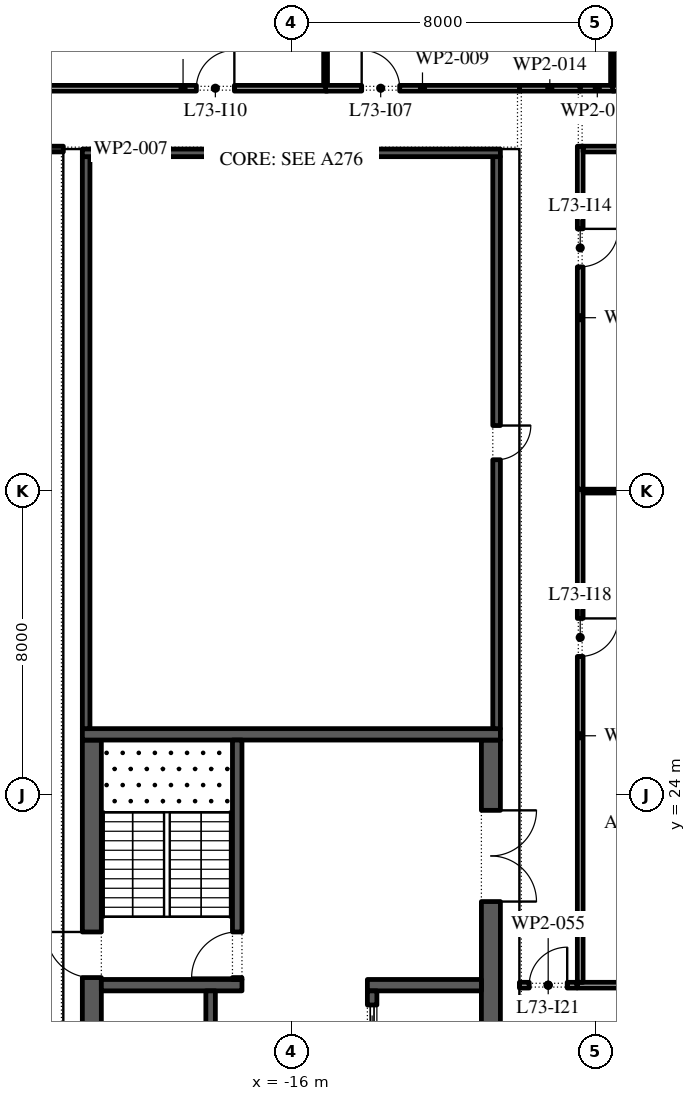
"""IFC4 building model, lengths in metres.
Left out: names, types, materials, properties, quantities, classifications, styles, units other than length and angle.
Written with IfcOpenShell. Run it as: python <this file> out.ifc"""

import sys

from ifc_helpers import new_model, si_unit, direction, frame, frame_2d, origin, place, context, subcontext, project, spatial, rectangle, extrude, element, fill, save


model = new_model("IFC4")
c1 = context("Model", 3, precision=1e-05, world=origin(), true_north=direction((0.0, 1.0)))
c2 = subcontext(c1, "Body", "Model", "MODEL_VIEW")
j1 = project(units=[si_unit("LENGTHUNIT", "METRE"), si_unit("PLANEANGLEUNIT", "RADIAN")], contexts=[c1])
p1 = place(None, origin())
s1 = spatial("IfcSite", under=j1, at=p1, CompositionType="ELEMENT")
p2 = place(p1, origin())
s2 = spatial("IfcBuilding", under=s1, at=p2, CompositionType="ELEMENT")
p3 = place(p2, frame((0.0, 0.0, 334.2)))
s3 = spatial("IfcBuildingStorey", under=s2, at=p3, CompositionType="ELEMENT", Elevation=334.2)
p4 = place(p3, frame((-21.25, -2.45, 0.0), z_axis=(0.0, 0.0, 1.0), x_axis=(0.0, 1.0, 0.0)))
e1 = element("IfcWall", 1, at=p4, inside=s3, PredefinedType="SHEAR", context=c2, shape_type="SweptSolid", body=[
    extrude(rectangle(XDim=27.9, YDim=0.5, at=frame_2d((13.95, 0.0))), origin(), (0.0, 0.0, 1.0), 4.0),
])
p5 = place(p4, frame((5.05, 0.0, 0.0)))
e2 = element("IfcOpeningElement", 2, at=p5, cuts=e1, PredefinedType="OPENING", context=c2, shape_type="SweptSolid", body=[
    extrude(rectangle(XDim=1.2, YDim=2.1, at=frame_2d((0.6, 1.05))), frame((0.0, 0.26, 0.0), z_axis=(0.0, -1.0, 0.0), x_axis=(1.0, 0.0, 0.0)), (0.0, 0.0, 1.0), 0.52),
])
p6 = place(p4, frame((21.65, 0.0, 0.0)))
e3 = element("IfcOpeningElement", 3, at=p6, cuts=e1, PredefinedType="OPENING", context=c2, shape_type="SweptSolid", body=[
    extrude(rectangle(XDim=1.2, YDim=2.1, at=frame_2d((0.6, 1.05))), frame((0.0, 0.26, 0.0), z_axis=(0.0, -1.0, 0.0), x_axis=(1.0, 0.0, 0.0)), (0.0, 0.0, 1.0), 0.52),
])
p7 = place(p3, frame((-10.75, -2.45, 0.0), z_axis=(0.0, 0.0, 1.0), x_axis=(0.0, 1.0, 0.0)))
e4 = element("IfcWall", 4, at=p7, inside=s3, PredefinedType="SHEAR", context=c2, shape_type="SweptSolid", body=[
    extrude(rectangle(XDim=27.9, YDim=0.5, at=frame_2d((13.95, 0.0))), origin(), (0.0, 0.0, 1.0), 4.0),
])
p8 = place(p7, frame((23.65, 0.0, 0.0)))
e5 = element("IfcOpeningElement", 5, at=p8, cuts=e4, PredefinedType="OPENING", context=c2, shape_type="SweptSolid", body=[
    extrude(rectangle(XDim=2.4, YDim=2.1, at=frame_2d((1.2, 1.05))), frame((0.0, 0.26, 0.0), z_axis=(0.0, -1.0, 0.0), x_axis=(1.0, 0.0, 0.0)), (0.0, 0.0, 1.0), 0.52),
])
p9 = place(p7, frame((0.788, 0.0, 0.0)))
e6 = element("IfcOpeningElement", 6, at=p9, cuts=e4, PredefinedType="OPENING", context=c2, shape_type="SweptSolid", body=[
    extrude(rectangle(XDim=0.9, YDim=2.1, at=frame_2d((0.45, 1.05))), frame((0.0, 0.26, 0.0), z_axis=(0.0, -1.0, 0.0), x_axis=(1.0, 0.0, 0.0)), (0.0, 0.0, 1.0), 0.52),
])
p10 = place(p7, frame((3.962, 0.0, 0.0)))
e7 = element("IfcOpeningElement", 7, at=p10, cuts=e4, PredefinedType="OPENING", context=c2, shape_type="SweptSolid", body=[
    extrude(rectangle(XDim=1.0, YDim=2.1, at=frame_2d((0.5, 1.05))), frame((0.0, 0.26, 0.0), z_axis=(0.0, -1.0, 0.0), x_axis=(1.0, 0.0, 0.0)), (0.0, 0.0, 1.0), 0.52),
])
p11 = place(p3, frame((-21.5, 25.6, 0.0), z_axis=(0.0, 0.0, 1.0), x_axis=(1.0, 0.0, 0.0)))
e8 = element("IfcWall", 8, at=p11, inside=s3, PredefinedType="SHEAR", context=c2, shape_type="SweptSolid", body=[
    extrude(rectangle(XDim=11.0, YDim=0.3, at=frame_2d((5.5, 0.0))), origin(), (0.0, 0.0, 1.0), 4.0),
])
p12 = place(p3, frame((-21.0, 19.0, 0.0), z_axis=(0.0, 0.0, 1.0), x_axis=(1.0, 0.0, 0.0)))
e9 = element("IfcWall", 9, at=p12, inside=s3, PredefinedType="SHEAR", context=c2, shape_type="SweptSolid", body=[
    extrude(rectangle(XDim=3.7, YDim=0.3, at=frame_2d((1.85, 0.0))), origin(), (0.0, 0.0, 1.0), 4.0),
])
p13 = place(p3, frame((-17.425, 19.15, 0.0), z_axis=(0.0, 0.0, 1.0), x_axis=(0.0, 1.0, 0.0)))
e10 = element("IfcWall", 10, at=p13, inside=s3, PredefinedType="SHEAR", context=c2, shape_type="SweptSolid", body=[
    extrude(rectangle(XDim=6.3, YDim=0.25, at=frame_2d((3.15, 0.0))), origin(), (0.0, 0.0, 1.0), 4.0),
])
p14 = place(p13, frame((0.05, 0.0, 0.0)))
e11 = element("IfcOpeningElement", 11, at=p14, cuts=e10, PredefinedType="OPENING", context=c2, shape_type="SweptSolid", body=[
    extrude(rectangle(XDim=1.2, YDim=2.1, at=frame_2d((0.6, 1.05))), frame((0.0, 0.135, 0.0), z_axis=(0.0, -1.0, 0.0), x_axis=(1.0, 0.0, 0.0)), (0.0, 0.0, 1.0), 0.27),
])
p15 = place(p3, frame((-18.125, 4.15, 0.0), z_axis=(0.0, 0.0, 1.0), x_axis=(0.0, 1.0, 0.0)))
e12 = element("IfcWall", 12, at=p15, inside=s3, PredefinedType="SHEAR", context=c2, shape_type="SweptSolid", body=[
    extrude(rectangle(XDim=14.7, YDim=0.25, at=frame_2d((7.35, 0.0))), origin(), (0.0, 0.0, 1.0), 4.0),
])
p16 = place(p15, frame((4.846, 0.0, 0.0)))
e13 = element("IfcOpeningElement", 13, at=p16, cuts=e12, PredefinedType="OPENING", context=c2, shape_type="SweptSolid", body=[
    extrude(rectangle(XDim=0.9, YDim=2.1, at=frame_2d((0.45, 1.05))), frame((0.0, 0.135, 0.0), z_axis=(0.0, -1.0, 0.0), x_axis=(1.0, 0.0, 0.0)), (0.0, 0.0, 1.0), 0.27),
])
p17 = place(p15, frame((11.125, 0.0, 0.0)))
e14 = element("IfcOpeningElement", 14, at=p17, cuts=e12, PredefinedType="OPENING", context=c2, shape_type="SweptSolid", body=[
    extrude(rectangle(XDim=0.9, YDim=2.1, at=frame_2d((0.45, 1.05))), frame((0.0, 0.135, 0.0), z_axis=(0.0, -1.0, 0.0), x_axis=(1.0, 0.0, 0.0)), (0.0, 0.0, 1.0), 0.27),
])
p18 = place(p15, frame((0.371, 0.0, 0.0)))
e15 = element("IfcOpeningElement", 15, at=p18, cuts=e12, PredefinedType="OPENING", context=c2, shape_type="SweptSolid", body=[
    extrude(rectangle(XDim=1.1, YDim=2.1, at=frame_2d((0.55, 1.05))), frame((0.0, 0.135, 0.0), z_axis=(0.0, -1.0, 0.0), x_axis=(1.0, 0.0, 0.0)), (0.0, 0.0, 1.0), 0.27),
])
p19 = place(p3, frame((-14.0, 19.0, 0.0), z_axis=(0.0, 0.0, 1.0), x_axis=(1.0, 0.0, 0.0)))
e16 = element("IfcWall", 16, at=p19, inside=s3, PredefinedType="SHEAR", context=c2, shape_type="SweptSolid", body=[
    extrude(rectangle(XDim=3.0, YDim=0.3, at=frame_2d((1.5, 0.0))), origin(), (0.0, 0.0, 1.0), 4.0),
])
p20 = place(p3, frame((-13.875, -2.45, 0.0), z_axis=(0.0, 0.0, 1.0), x_axis=(0.0, 1.0, 0.0)))
e17 = element("IfcWall", 17, at=p20, inside=s3, PredefinedType="SHEAR", context=c2, shape_type="SweptSolid", body=[
    extrude(rectangle(XDim=21.3, YDim=0.25, at=frame_2d((10.65, 0.0))), origin(), (0.0, 0.0, 1.0), 4.0),
])
p21 = place(p20, frame((11.357, 0.0, 0.0)))
e18 = element("IfcOpeningElement", 18, at=p21, cuts=e17, PredefinedType="OPENING", context=c2, shape_type="SweptSolid", body=[
    extrude(rectangle(XDim=0.9, YDim=2.1, at=frame_2d((0.45, 1.05))), frame((0.0, 0.135, 0.0), z_axis=(0.0, -1.0, 0.0), x_axis=(1.0, 0.0, 0.0)), (0.0, 0.0, 1.0), 0.27),
])
p22 = place(p20, frame((6.971, 0.0, 0.0)))
e19 = element("IfcOpeningElement", 19, at=p22, cuts=e17, PredefinedType="OPENING", context=c2, shape_type="SweptSolid", body=[
    extrude(rectangle(XDim=1.1, YDim=2.1, at=frame_2d((0.55, 1.05))), frame((0.0, 0.135, 0.0), z_axis=(0.0, -1.0, 0.0), x_axis=(1.0, 0.0, 0.0)), (0.0, 0.0, 1.0), 0.27),
])
p23 = place(p20, frame((15.543, 0.0, 0.0)))
e20 = element("IfcOpeningElement", 20, at=p23, cuts=e17, PredefinedType="OPENING", context=c2, shape_type="SweptSolid", body=[
    extrude(rectangle(XDim=1.1, YDim=2.1, at=frame_2d((0.55, 1.05))), frame((0.0, 0.135, 0.0), z_axis=(0.0, -1.0, 0.0), x_axis=(1.0, 0.0, 0.0)), (0.0, 0.0, 1.0), 0.27),
])
p24 = place(p20, frame((17.686, 0.0, 0.0)))
e21 = element("IfcOpeningElement", 21, at=p24, cuts=e17, PredefinedType="OPENING", context=c2, shape_type="SweptSolid", body=[
    extrude(rectangle(XDim=1.1, YDim=2.1, at=frame_2d((0.55, 1.05))), frame((0.0, 0.135, 0.0), z_axis=(0.0, -1.0, 0.0), x_axis=(1.0, 0.0, 0.0)), (0.0, 0.0, 1.0), 0.27),
])
p25 = place(p20, frame((19.829, 0.0, 0.0)))
e22 = element("IfcOpeningElement", 22, at=p25, cuts=e17, PredefinedType="OPENING", context=c2, shape_type="SweptSolid", body=[
    extrude(rectangle(XDim=1.1, YDim=2.1, at=frame_2d((0.55, 1.05))), frame((0.0, 0.135, 0.0), z_axis=(0.0, -1.0, 0.0), x_axis=(1.0, 0.0, 0.0)), (0.0, 0.0, 1.0), 0.27),
])
p26 = place(p3, frame((-21.4, 25.75, 0.0), z_axis=(0.0, 0.0, 1.0), x_axis=(0.0, 1.0, 0.0)))
e23 = element("IfcWall", 23, at=p26, inside=s3, PredefinedType="SHEAR", context=c2, shape_type="SweptSolid", body=[
    extrude(rectangle(XDim=15.05, YDim=0.2, at=frame_2d((7.525, 0.0))), origin(), (0.0, 0.0, 1.0), 4.0),
])
p27 = place(p3, frame((-10.6, 25.75, 0.0), z_axis=(0.0, 0.0, 1.0), x_axis=(0.0, 1.0, 0.0)))
e24 = element("IfcWall", 24, at=p27, inside=s3, PredefinedType="SHEAR", context=c2, shape_type="SweptSolid", body=[
    extrude(rectangle(XDim=15.05, YDim=0.2, at=frame_2d((7.525, 0.0))), origin(), (0.0, 0.0, 1.0), 4.0),
])
p28 = place(p27, frame((7.075, 0.0, 0.0)))
e25 = element("IfcOpeningElement", 25, at=p28, cuts=e24, PredefinedType="OPENING", context=c2, shape_type="SweptSolid", body=[
    extrude(rectangle(XDim=0.9, YDim=2.1, at=frame_2d((0.45, 1.05))), frame((0.0, 0.11, 0.0), z_axis=(0.0, -1.0, 0.0), x_axis=(1.0, 0.0, 0.0)), (0.0, 0.0, 1.0), 0.22),
])
p29 = place(p3, frame((-21.5, 40.9, 0.0), z_axis=(0.0, 0.0, 1.0), x_axis=(1.0, 0.0, 0.0)))
e26 = element("IfcWall", 26, at=p29, inside=s3, PredefinedType="SHEAR", context=c2, shape_type="SweptSolid", body=[
    extrude(rectangle(XDim=11.0, YDim=0.2, at=frame_2d((5.5, 0.0))), origin(), (0.0, 0.0, 1.0), 4.0),
])
p30 = place(p3, frame((-22.65, 42.6, 0.0), z_axis=(0.0, 0.0, 1.0), x_axis=(1.0, 0.0, 0.0)))
e27 = element("IfcWall", 27, at=p30, inside=s3, PredefinedType="PARTITIONING", context=c2, shape_type="SweptSolid", body=[
    extrude(rectangle(XDim=7.6, YDim=0.15, at=frame_2d((3.8, 0.0))), origin(), (0.0, 0.0, 1.0), 4.0),
])
p31 = place(p30, frame((4.15, 0.0, 0.0)))
e28 = element("IfcOpeningElement", 28, at=p31, cuts=e27, PredefinedType="OPENING", context=c2, shape_type="SweptSolid", body=[
    extrude(rectangle(XDim=1.0, YDim=2.1, at=frame_2d((0.5, 1.05))), frame((0.0, 0.085, 0.0), z_axis=(0.0, -1.0, 0.0), x_axis=(1.0, 0.0, 0.0)), (0.0, 0.0, 1.0), 0.17),
])
p32 = place(p3, frame((-22.0, 41.0, 0.0), z_axis=(0.0, 0.0, 1.0), x_axis=(-1.0, 0.0, 0.0)))
e29 = element("IfcWall", 29, at=p32, inside=s3, PredefinedType="PARTITIONING", context=c2, shape_type="SweptSolid", body=[
    extrude(rectangle(XDim=4.05, YDim=0.15, at=frame_2d((2.025, 0.0))), origin(), (0.0, 0.0, 1.0), 4.0),
])
p33 = place(p32, frame((2.1, 0.0, 0.0)))
e30 = element("IfcOpeningElement", 30, at=p33, cuts=e29, PredefinedType="OPENING", context=c2, shape_type="SweptSolid", body=[
    extrude(rectangle(XDim=1.0, YDim=2.1, at=frame_2d((0.5, 1.05))), frame((0.0, 0.085, 0.0), z_axis=(0.0, -1.0, 0.0), x_axis=(1.0, 0.0, 0.0)), (0.0, 0.0, 1.0), 0.17),
])
p34 = place(p3, frame((-15.1, 42.675, 0.0), z_axis=(0.0, 0.0, 1.0), x_axis=(0.0, 1.0, 0.0)))
e31 = element("IfcWall", 31, at=p34, inside=s3, PredefinedType="PARTITIONING", context=c2, shape_type="SweptSolid", body=[
    extrude(rectangle(XDim=4.375, YDim=0.1, at=frame_2d((2.188, 0.0))), origin(), (0.0, 0.0, 1.0), 4.0),
])
p35 = place(p3, frame((-15.1, 42.6, 0.0), z_axis=(0.0, 0.0, 1.0), x_axis=(1.0, 0.0, 0.0)))
e32 = element("IfcWall", 32, at=p35, inside=s3, PredefinedType="PARTITIONING", context=c2, shape_type="SweptSolid", body=[
    extrude(rectangle(XDim=5.1, YDim=0.15, at=frame_2d((2.55, 0.0))), origin(), (0.0, 0.0, 1.0), 4.0),
])
p36 = place(p35, frame((0.95, 0.0, 0.0)))
e33 = element("IfcOpeningElement", 33, at=p36, cuts=e32, PredefinedType="OPENING", context=c2, shape_type="SweptSolid", body=[
    extrude(rectangle(XDim=1.0, YDim=2.1, at=frame_2d((0.5, 1.05))), frame((0.0, 0.085, 0.0), z_axis=(0.0, -1.0, 0.0), x_axis=(1.0, 0.0, 0.0)), (0.0, 0.0, 1.0), 0.17),
])
p37 = place(p3, frame((-10.0, 42.6, 0.0), z_axis=(0.0, 0.0, 1.0), x_axis=(1.0, 0.0, 0.0)))
e34 = element("IfcWall", 34, at=p37, inside=s3, PredefinedType="PARTITIONING", context=c2, shape_type="SweptSolid", body=[
    extrude(rectangle(XDim=1.6, YDim=0.15, at=frame_2d((0.8, 0.0))), origin(), (0.0, 0.0, 1.0), 4.0),
])
p38 = place(p3, frame((-8.475, 19.0, 0.0), z_axis=(0.0, 0.0, 1.0), x_axis=(1.0, 0.0, 0.0)))
e35 = element("IfcWall", 35, at=p38, inside=s3, PredefinedType="PARTITIONING", context=c2, shape_type="SweptSolid", body=[
    extrude(rectangle(XDim=5.525, YDim=0.15, at=frame_2d((2.763, 0.0))), origin(), (0.0, 0.0, 1.0), 4.0),
])
p39 = place(p3, frame((-8.4, 32.05, 0.0), z_axis=(0.0, 0.0, 1.0), x_axis=(0.0, -1.0, 0.0)))
e36 = element("IfcWall", 36, at=p39, inside=s3, PredefinedType="PARTITIONING", context=c2, shape_type="SweptSolid", body=[
    extrude(rectangle(XDim=12.975, YDim=0.15, at=frame_2d((6.488, 0.0))), origin(), (0.0, 0.0, 1.0), 4.0),
])
p40 = place(p39, frame((3.4, 0.0, 0.0)))
e37 = element("IfcOpeningElement", 37, at=p40, cuts=e36, PredefinedType="OPENING", context=c2, shape_type="SweptSolid", body=[
    extrude(rectangle(XDim=1.0, YDim=2.1, at=frame_2d((0.5, 1.05))), frame((0.0, 0.085, 0.0), z_axis=(0.0, -1.0, 0.0), x_axis=(1.0, 0.0, 0.0)), (0.0, 0.0, 1.0), 0.17),
])
p41 = place(p3, frame((-8.4, 41.075, 0.0), z_axis=(0.0, 0.0, 1.0), x_axis=(0.0, -1.0, 0.0)))
e38 = element("IfcWall", 38, at=p41, inside=s3, PredefinedType="PARTITIONING", context=c2, shape_type="SweptSolid", body=[
    extrude(rectangle(XDim=9.025, YDim=0.15, at=frame_2d((4.512, 0.0))), origin(), (0.0, 0.0, 1.0), 4.0),
])
p42 = place(p41, frame((2.175, 0.0, 0.0)))
e39 = element("IfcOpeningElement", 39, at=p42, cuts=e38, PredefinedType="OPENING", context=c2, shape_type="SweptSolid", body=[
    extrude(rectangle(XDim=1.0, YDim=2.1, at=frame_2d((0.5, 1.05))), frame((0.0, 0.085, 0.0), z_axis=(0.0, -1.0, 0.0), x_axis=(1.0, 0.0, 0.0)), (0.0, 0.0, 1.0), 0.17),
])
p43 = place(p3, frame((-8.4, 42.6, 0.0), z_axis=(0.0, 0.0, 1.0), x_axis=(1.0, 0.0, 0.0)))
e40 = element("IfcWall", 40, at=p43, inside=s3, PredefinedType="PARTITIONING", context=c2, shape_type="SweptSolid", body=[
    extrude(rectangle(XDim=0.9, YDim=0.15, at=frame_2d((0.45, 0.0))), origin(), (0.0, 0.0, 1.0), 4.0),
])
p44 = place(p3, frame((-7.55, 42.675, 0.0), z_axis=(0.0, 0.0, 1.0), x_axis=(0.0, 1.0, 0.0)))
e41 = element("IfcWall", 41, at=p44, inside=s3, PredefinedType="PARTITIONING", context=c2, shape_type="SweptSolid", body=[
    extrude(rectangle(XDim=4.775, YDim=0.1, at=frame_2d((2.387, 0.0))), origin(), (0.0, 0.0, 1.0), 3.164),
])
p45 = place(p3, frame((-7.55, 42.6, 0.0), z_axis=(0.0, 0.0, 1.0), x_axis=(1.0, 0.0, 0.0)))
e42 = element("IfcWall", 42, at=p45, inside=s3, PredefinedType="PARTITIONING", context=c2, shape_type="SweptSolid", body=[
    extrude(rectangle(XDim=7.5, YDim=0.15, at=frame_2d((3.75, 0.0))), origin(), (0.0, 0.0, 1.0), 4.0),
])
p46 = place(p45, frame((1.65, 0.0, 0.0)))
e43 = element("IfcOpeningElement", 43, at=p46, cuts=e42, PredefinedType="OPENING", context=c2, shape_type="SweptSolid", body=[
    extrude(rectangle(XDim=1.0, YDim=2.1, at=frame_2d((0.5, 1.05))), frame((0.0, 0.085, 0.0), z_axis=(0.0, -1.0, 0.0), x_axis=(1.0, 0.0, 0.0)), (0.0, 0.0, 1.0), 0.17),
])
p47 = place(p3, frame((-4.45, 32.0, 0.0), z_axis=(0.0, 0.0, 1.0), x_axis=(-1.0, 0.0, 0.0)))
e44 = element("IfcWall", 44, at=p47, inside=s3, PredefinedType="PARTITIONING", context=c2, shape_type="SweptSolid", body=[
    extrude(rectangle(XDim=3.875, YDim=0.1, at=frame_2d((1.938, 0.0))), origin(), (0.0, 0.0, 1.0), 4.0),
])
p48 = place(p3, frame((-4.55, 41.0, 0.0), z_axis=(0.0, 0.0, 1.0), x_axis=(-1.0, 0.0, 0.0)))
e45 = element("IfcWall", 45, at=p48, inside=s3, PredefinedType="PARTITIONING", context=c2, shape_type="SweptSolid", body=[
    extrude(rectangle(XDim=3.775, YDim=0.15, at=frame_2d((1.887, 0.0))), origin(), (0.0, 0.0, 1.0), 4.0),
])
p49 = place(p3, frame((-10.0, 19.0, 0.0), z_axis=(0.0, 0.0, 1.0), x_axis=(1.0, 0.0, 0.0)))
e46 = element("IfcWall", 46, at=p49, inside=s3, PredefinedType="PARTITIONING", context=c2, shape_type="SweptSolid", body=[
    extrude(rectangle(XDim=1.515, YDim=0.15, at=frame_2d((0.757, 0.0))), origin(), (0.0, 0.0, 1.0), 4.0),
])
p50 = place(p49, frame((0.258, 0.0, 0.0)))
e47 = element("IfcOpeningElement", 47, at=p50, cuts=e46, PredefinedType="OPENING", context=c2, shape_type="SweptSolid", body=[
    extrude(rectangle(XDim=1.0, YDim=2.1, at=frame_2d((0.5, 1.05))), frame((0.0, 0.085, 0.0), z_axis=(0.0, -1.0, 0.0), x_axis=(1.0, 0.0, 0.0)), (0.0, 0.0, 1.0), 0.17),
])
p51 = place(p25, origin())
e48 = element("IfcDoor", 48, at=p51, inside=s3, OperationType="SLIDING_TO_LEFT", PredefinedType="DOOR", context=c2, shape_type="SweptSolid", body=[
    extrude(rectangle(XDim=1.1, YDim=2.1, at=frame_2d((0.55, 1.05))), frame((0.0, 0.025, 0.0), z_axis=(0.0, -1.0, 0.0), x_axis=(1.0, 0.0, 0.0)), (0.0, 0.0, 1.0), 0.05),
])
fill(e22, e48)
p52 = place(p8, frame((2.4, 0.0, 0.0), z_axis=(0.0, 0.0, 1.0), x_axis=(-1.0, 0.0, 0.0)))
e49 = element("IfcDoor", 49, at=p52, inside=s3, OperationType="DOUBLE_DOOR_SINGLE_SWING", PredefinedType="DOOR", context=c2, shape_type="SweptSolid", body=[
    extrude(rectangle(XDim=2.4, YDim=2.1, at=frame_2d((1.2, 1.05))), frame((0.0, 0.025, 0.0), z_axis=(0.0, -1.0, 0.0), x_axis=(1.0, 0.0, 0.0)), (0.0, 0.0, 1.0), 0.05),
])
fill(e5, e49)
p53 = place(p14, origin())
e50 = element("IfcDoor", 50, at=p53, inside=s3, OperationType="SINGLE_SWING_RIGHT", PredefinedType="DOOR", context=c2, shape_type="SweptSolid", body=[
    extrude(rectangle(XDim=1.2, YDim=2.1, at=frame_2d((0.6, 1.05))), frame((0.0, 0.025, 0.0), z_axis=(0.0, -1.0, 0.0), x_axis=(1.0, 0.0, 0.0)), (0.0, 0.0, 1.0), 0.05),
])
fill(e11, e50)
p54 = place(p6, origin())
e51 = element("IfcDoor", 51, at=p54, inside=s3, OperationType="SINGLE_SWING_LEFT", PredefinedType="DOOR", context=c2, shape_type="SweptSolid", body=[
    extrude(rectangle(XDim=1.2, YDim=2.1, at=frame_2d((0.6, 1.05))), frame((0.0, 0.025, 0.0), z_axis=(0.0, -1.0, 0.0), x_axis=(1.0, 0.0, 0.0)), (0.0, 0.0, 1.0), 0.05),
])
fill(e3, e51)
p55 = place(p28, frame((0.9, 0.15, 0.0), z_axis=(0.0, 0.0, 1.0), x_axis=(-1.0, 0.0, 0.0)))
e52 = element("IfcDoor", 52, at=p55, inside=s3, OperationType="SINGLE_SWING_RIGHT", PredefinedType="DOOR", context=c2, shape_type="SweptSolid", body=[
    extrude(rectangle(XDim=0.9, YDim=2.1, at=frame_2d((0.45, 1.05))), frame((0.0, 0.1, 0.0), z_axis=(0.0, -1.0, 0.0), x_axis=(1.0, 0.0, 0.0)), (0.0, 0.0, 1.0), 0.05),
])
fill(e25, e52)
p56 = place(p36, origin())
e53 = element("IfcDoor", 53, at=p56, inside=s3, OperationType="SINGLE_SWING_RIGHT", PredefinedType="DOOR", context=c2, shape_type="SweptSolid", body=[
    extrude(rectangle(XDim=1.0, YDim=2.1, at=frame_2d((0.5, 1.05))), frame((0.0, 0.025, 0.0), z_axis=(0.0, -1.0, 0.0), x_axis=(1.0, 0.0, 0.0)), (0.0, 0.0, 1.0), 0.05),
])
fill(e33, e53)
p57 = place(p31, origin())
e54 = element("IfcDoor", 54, at=p57, inside=s3, OperationType="SINGLE_SWING_LEFT", PredefinedType="DOOR", context=c2, shape_type="SweptSolid", body=[
    extrude(rectangle(XDim=1.0, YDim=2.1, at=frame_2d((0.5, 1.05))), frame((0.0, 0.025, 0.0), z_axis=(0.0, -1.0, 0.0), x_axis=(1.0, 0.0, 0.0)), (0.0, 0.0, 1.0), 0.05),
])
fill(e28, e54)
p58 = place(p42, origin())
e55 = element("IfcDoor", 55, at=p58, inside=s3, OperationType="SINGLE_SWING_RIGHT", PredefinedType="DOOR", context=c2, shape_type="SweptSolid", body=[
    extrude(rectangle(XDim=1.0, YDim=2.1, at=frame_2d((0.5, 1.05))), frame((0.0, 0.025, 0.0), z_axis=(0.0, -1.0, 0.0), x_axis=(1.0, 0.0, 0.0)), (0.0, 0.0, 1.0), 0.05),
])
fill(e39, e55)
p59 = place(p40, origin())
e56 = element("IfcDoor", 56, at=p59, inside=s3, OperationType="SINGLE_SWING_RIGHT", PredefinedType="DOOR", context=c2, shape_type="SweptSolid", body=[
    extrude(rectangle(XDim=1.0, YDim=2.1, at=frame_2d((0.5, 1.05))), frame((0.0, 0.025, 0.0), z_axis=(0.0, -1.0, 0.0), x_axis=(1.0, 0.0, 0.0)), (0.0, 0.0, 1.0), 0.05),
])
fill(e37, e56)
p60 = place(p50, origin())
e57 = element("IfcDoor", 57, at=p60, inside=s3, OperationType="SINGLE_SWING_LEFT", PredefinedType="DOOR", context=c2, shape_type="SweptSolid", body=[
    extrude(rectangle(XDim=1.0, YDim=2.1, at=frame_2d((0.5, 1.05))), frame((0.0, 0.025, 0.0), z_axis=(0.0, -1.0, 0.0), x_axis=(1.0, 0.0, 0.0)), (0.0, 0.0, 1.0), 0.05),
])
fill(e47, e57)
save(model, sys.argv[1])
